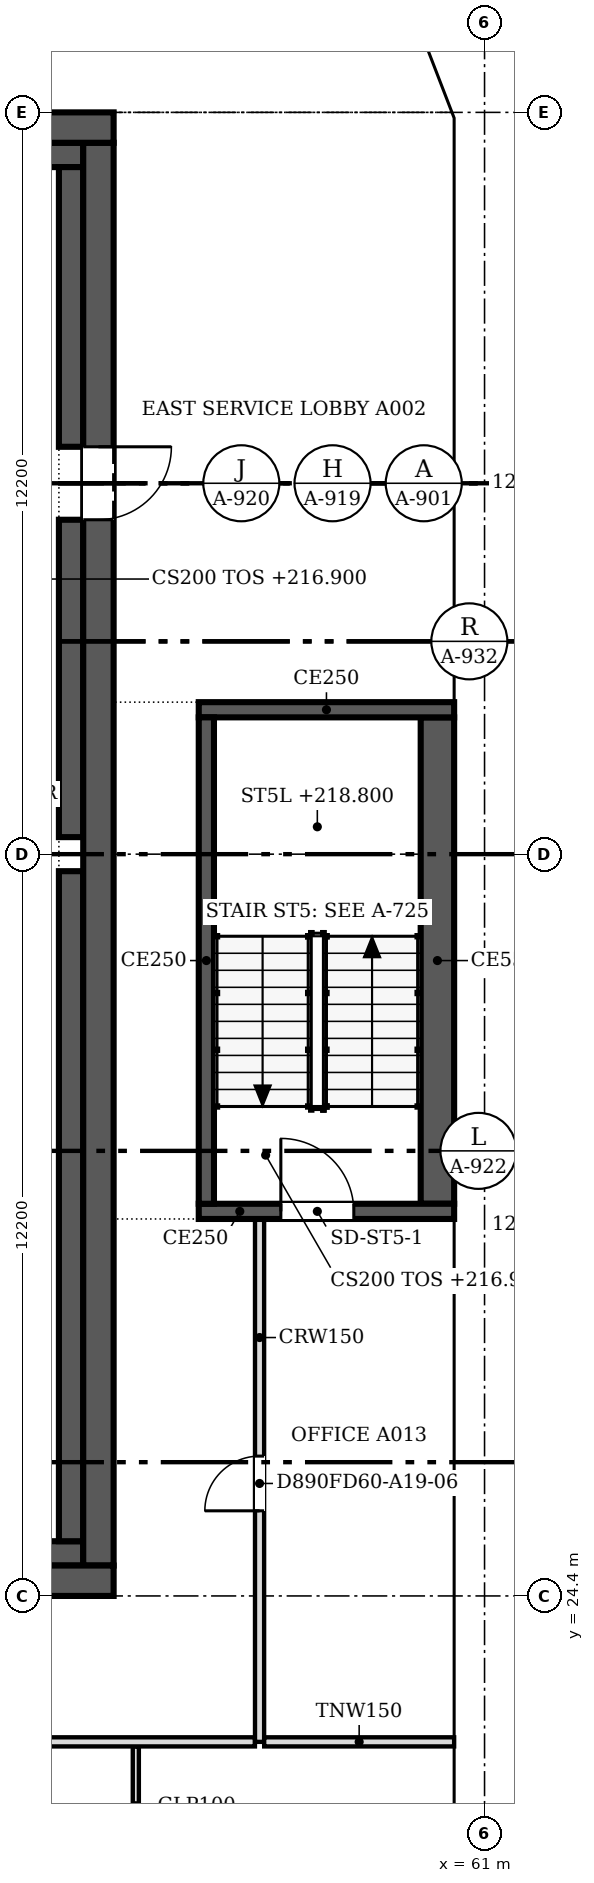
"""IFC4 building model, lengths in metres.
Left out: names, types, materials, properties, quantities, classifications, styles, units other than length and angle.
Written with IfcOpenShell. Run it as: python <this file> out.ifc"""

import sys

from ifc_helpers import new_model, si_unit, direction, frame, frame_2d, origin, place, context, subcontext, project, spatial, polyline, rectangle, outline, extrude, faceted_brep, source, transform, mapped, element, fill, save


model = new_model("IFC4")
c1 = context("Model", 3, precision=1e-05, world=origin(), true_north=direction((0.0, 1.0)))
c2 = subcontext(c1, "Body", "Model", "MODEL_VIEW")
j1 = project(units=[si_unit("LENGTHUNIT", "METRE"), si_unit("PLANEANGLEUNIT", "RADIAN")], contexts=[c1])
p1 = place(None, origin())
s1 = spatial("IfcSite", under=j1, at=p1, CompositionType="ELEMENT")
p2 = place(p1, origin())
s2 = spatial("IfcBuilding", under=s1, at=p2, CompositionType="ELEMENT")
p3 = place(p2, frame((0.0, 0.0, 216.9)))
s3 = spatial("IfcBuildingStorey", under=s2, at=p3, CompositionType="ELEMENT", Elevation=216.9)
m1 = source(origin(), c2, "Body", "SweptSolid", [
    extrude(outline(polyline([(3.05, 0.0), (6.1, 3.8), (3.05, 7.6), (0.0, 3.8), (3.05, 0.0)])), frame((0.0, 0.25, 0.0), z_axis=(0.0, -1.0, 0.0), x_axis=(1.0, 0.0, 0.0)), (0.0, 0.0, 1.0), 0.5),
])
p4 = place(p3, frame((60.75, 15.25, -3.8), z_axis=(0.0, 0.0, 1.0), x_axis=(0.0, 1.0, 0.0)))
e1 = element("IfcWall", 1, at=p4, inside=s3, PredefinedType="SOLIDWALL", context=c2, shape_type="MappedRepresentation", body=[
    mapped(m1, transform((0.0, 0.0, 0.0), scale=1.0)),
])
m2 = source(origin(), c2, "Body", "SweptSolid", [
    extrude(outline(polyline([(3.05, 0.399), (5.78, 3.8), (3.05, 7.2), (0.321, 3.8), (3.05, 0.399)])), frame((0.0, 0.26, 0.0), z_axis=(0.0, -1.0, 0.0), x_axis=(1.0, 0.0, 0.0)), (0.0, 0.0, 1.0), 0.52),
])
p5 = place(p4, origin())
e2 = element("IfcOpeningElement", 2, at=p5, cuts=e1, PredefinedType="OPENING", context=c2, shape_type="MappedRepresentation", body=[
    mapped(m2, transform((0.0, 0.0, 0.0), scale=1.0)),
])
m3 = source(origin(), c2, "Body", "Brep", [
    faceted_brep([(3.05, -0.25, 0.0), (6.1, -0.25, 3.8), (6.1, -0.25, 3.8), (3.05, -0.25, 7.6), (0.0, -0.25, 3.8), (0.0, 0.25, 3.8), (3.05, 0.25, 7.6), (6.1, 0.25, 3.8), (6.1, 0.25, 3.8), (3.05, 0.25, 0.0)], [[[0, 1, 2, 3, 4]], [[5, 6, 7, 8, 9]], [[9, 8, 1, 0]], [[7, 6, 3, 2]], [[6, 5, 4, 3]], [[5, 9, 0, 4]], [[1, 8, 7, 2]]]),
])
p6 = place(p3, frame((60.75, 21.35, -3.8), z_axis=(0.0, 0.0, 1.0), x_axis=(0.0, 1.0, 0.0)))
e3 = element("IfcWall", 3, at=p6, inside=s3, PredefinedType="SOLIDWALL", context=c2, shape_type="MappedRepresentation", body=[
    mapped(m3, transform((0.0, 0.0, 0.0), scale=1.0)),
])
p7 = place(p6, origin())
e4 = element("IfcOpeningElement", 4, at=p7, cuts=e3, PredefinedType="OPENING", context=c2, shape_type="MappedRepresentation", body=[
    mapped(m2, transform((0.0, 0.0, 0.0), scale=1.0)),
])
p8 = place(p3, frame((60.75, 27.45, -3.8), z_axis=(0.0, 0.0, 1.0), x_axis=(0.0, 1.0, 0.0)))
e5 = element("IfcWall", 5, at=p8, inside=s3, PredefinedType="SOLIDWALL", context=c2, shape_type="MappedRepresentation", body=[
    mapped(m1, transform((0.0, 0.0, 0.0), scale=1.0)),
])
p9 = place(p8, origin())
e6 = element("IfcOpeningElement", 6, at=p9, cuts=e5, PredefinedType="OPENING", context=c2, shape_type="MappedRepresentation", body=[
    mapped(m2, transform((0.0, 0.0, 0.0), scale=1.0)),
])
p10 = place(p3, frame((60.75, 33.55, -3.8), z_axis=(0.0, 0.0, 1.0), x_axis=(0.0, 1.0, 0.0)))
e7 = element("IfcWall", 7, at=p10, inside=s3, PredefinedType="SOLIDWALL", context=c2, shape_type="MappedRepresentation", body=[
    mapped(m3, transform((0.0, 0.0, 0.0), scale=1.0)),
])
p11 = place(p10, origin())
e8 = element("IfcOpeningElement", 8, at=p11, cuts=e7, PredefinedType="OPENING", context=c2, shape_type="MappedRepresentation", body=[
    mapped(m2, transform((0.0, 0.0, 0.0), scale=1.0)),
])
p12 = place(p3, frame((60.75, 39.65, -3.8), z_axis=(0.0, 0.0, 1.0), x_axis=(0.0, 1.0, 0.0)))
e9 = element("IfcWall", 9, at=p12, inside=s3, PredefinedType="SOLIDWALL", context=c2, shape_type="MappedRepresentation", body=[
    mapped(m1, transform((0.0, 0.0, 0.0), scale=1.0)),
])
p13 = place(p12, origin())
e10 = element("IfcOpeningElement", 10, at=p13, cuts=e9, PredefinedType="OPENING", context=c2, shape_type="MappedRepresentation", body=[
    mapped(m2, transform((0.0, 0.0, 0.0), scale=1.0)),
])
m4 = source(origin(), c2, "Body", "Brep", [
    faceted_brep([(3.003, -0.25, 0.0), (3.05, -0.25, 0.06), (3.05, -0.25, 7.54), (3.003, -0.25, 7.6), (0.0, -0.25, 3.8), (0.0, 0.25, 3.8), (2.957, 0.25, 7.541), (2.957, 0.25, 0.059), (3.003, 0.0, 0.0), (3.003, 0.0, 7.6)], [[[0, 1, 2, 3, 4]], [[5, 6, 7]], [[1, 0, 8]], [[9, 3, 2]], [[6, 5, 4, 3, 9]], [[5, 7, 8, 0, 4]], [[1, 8, 7, 6, 9, 2]]]),
])
p14 = place(p3, frame((60.75, 45.75, -3.8), z_axis=(0.0, 0.0, 1.0), x_axis=(0.0, 1.0, 0.0)))
e11 = element("IfcWall", 11, at=p14, inside=s3, PredefinedType="SOLIDWALL", context=c2, shape_type="MappedRepresentation", body=[
    mapped(m4, transform((0.0, 0.0, 0.0), scale=1.0)),
])
m5 = source(origin(), c2, "Body", "SweptSolid", [
    extrude(outline(polyline([(2.803, 6.944), (0.319, 3.8), (2.803, 0.656), (2.803, 6.944)])), frame((0.0, 0.26, 0.0), z_axis=(0.0, -1.0, 0.0), x_axis=(1.0, 0.0, 0.0)), (0.0, 0.0, 1.0), 0.52),
])
p15 = place(p14, origin())
e12 = element("IfcOpeningElement", 12, at=p15, cuts=e11, PredefinedType="OPENING", context=c2, shape_type="MappedRepresentation", body=[
    mapped(m5, transform((0.0, 0.0, 0.0), scale=1.0)),
])
m6 = source(origin(), c2, "Body", "Brep", [
    faceted_brep([(0.047, -0.25, 0.0), (2.997, -0.25, 3.8), (0.047, -0.25, 7.6), (0.0, -0.25, 7.541), (0.0, -0.25, 0.059), (0.093, 0.25, 7.54), (2.944, 0.25, 3.868), (2.944, 0.25, 3.732), (0.093, 0.25, 0.06), (2.997, 0.0, 3.8), (0.047, 0.0, 0.0), (0.047, 0.0, 7.6)], [[[0, 1, 2, 3, 4]], [[5, 6, 7, 8]], [[8, 7, 9, 1, 0, 10]], [[6, 5, 11, 2, 1, 9]], [[3, 2, 11]], [[10, 0, 4]], [[8, 10, 4, 3, 11, 5]], [[9, 7, 6]]]),
])
p16 = place(p3, frame((60.767, 48.71, -3.8), z_axis=(0.0, 0.0, 1.0), x_axis=(-0.359901446078, 0.932990326376, 0.0)))
e13 = element("IfcWall", 13, at=p16, inside=s3, PredefinedType="SOLIDWALL", context=c2, shape_type="MappedRepresentation", body=[
    mapped(m6, transform((0.0, 0.0, 0.0), scale=1.0)),
])
m7 = source(origin(), c2, "Body", "SweptSolid", [
    extrude(outline(polyline([(0.247, 0.665), (2.681, 3.8), (0.247, 6.935), (0.247, 0.665)])), frame((0.0, 0.26, 0.0), z_axis=(0.0, -1.0, 0.0), x_axis=(1.0, 0.0, 0.0)), (0.0, 0.0, 1.0), 0.52),
])
p17 = place(p16, origin())
e14 = element("IfcOpeningElement", 14, at=p17, cuts=e13, PredefinedType="OPENING", context=c2, shape_type="MappedRepresentation", body=[
    mapped(m7, transform((0.0, 0.0, 0.0), scale=1.0)),
])
p18 = place(p2, frame((0.0, 0.0, 220.7)))
s4 = spatial("IfcBuildingStorey", under=s2, at=p18, CompositionType="ELEMENT", Elevation=220.7)
m8 = source(origin(), c2, "Body", "Brep", [
    faceted_brep([(3.05, -0.25, 0.0), (6.1, -0.25, 3.8), (6.1, -0.25, 3.8), (3.05, -0.25, 7.6), (0.0, -0.25, 3.8), (0.0, 0.25, 3.8), (3.05, 0.25, 7.6), (6.1, 0.25, 3.8), (6.1, 0.25, 3.8), (3.05, 0.25, 0.0)], [[[0, 1, 2, 3, 4]], [[5, 6, 7, 8, 9]], [[9, 8, 1, 0]], [[7, 6, 3, 2]], [[6, 5, 4, 3]], [[5, 9, 0, 4]], [[1, 8, 7, 2]]]),
])
p19 = place(p18, frame((60.75, 18.3, -3.8), z_axis=(0.0, 0.0, 1.0), x_axis=(0.0, 1.0, 0.0)))
e15 = element("IfcWall", 15, at=p19, inside=s4, PredefinedType="SOLIDWALL", context=c2, shape_type="MappedRepresentation", body=[
    mapped(m8, transform((0.0, 0.0, 0.0), scale=1.0)),
])
m9 = source(origin(), c2, "Body", "SweptSolid", [
    extrude(outline(polyline([(3.05, 0.399), (5.78, 3.8), (3.05, 7.201), (0.321, 3.8), (3.05, 0.399)])), frame((0.0, 0.26, 0.0), z_axis=(0.0, -1.0, 0.0), x_axis=(1.0, 0.0, 0.0)), (0.0, 0.0, 1.0), 0.52),
])
p20 = place(p19, origin())
e16 = element("IfcOpeningElement", 16, at=p20, cuts=e15, PredefinedType="OPENING", context=c2, shape_type="MappedRepresentation", body=[
    mapped(m9, transform((0.0, 0.0, 0.0), scale=1.0)),
])
m10 = source(origin(), c2, "Body", "SweptSolid", [
    extrude(outline(polyline([(3.05, 0.0), (6.1, 3.8), (3.05, 7.6), (0.0, 3.8), (3.05, 0.0)])), frame((0.0, 0.25, 0.0), z_axis=(0.0, -1.0, 0.0), x_axis=(1.0, 0.0, 0.0)), (0.0, 0.0, 1.0), 0.5),
])
p21 = place(p18, frame((60.75, 24.4, -3.8), z_axis=(0.0, 0.0, 1.0), x_axis=(0.0, 1.0, 0.0)))
e17 = element("IfcWall", 17, at=p21, inside=s4, PredefinedType="SOLIDWALL", context=c2, shape_type="MappedRepresentation", body=[
    mapped(m10, transform((0.0, 0.0, 0.0), scale=1.0)),
])
p22 = place(p21, origin())
e18 = element("IfcOpeningElement", 18, at=p22, cuts=e17, PredefinedType="OPENING", context=c2, shape_type="MappedRepresentation", body=[
    mapped(m9, transform((0.0, 0.0, 0.0), scale=1.0)),
])
p23 = place(p18, frame((60.75, 30.5, -3.8), z_axis=(0.0, 0.0, 1.0), x_axis=(0.0, 1.0, 0.0)))
e19 = element("IfcWall", 19, at=p23, inside=s4, PredefinedType="SOLIDWALL", context=c2, shape_type="MappedRepresentation", body=[
    mapped(m10, transform((0.0, 0.0, 0.0), scale=1.0)),
])
p24 = place(p23, origin())
e20 = element("IfcOpeningElement", 20, at=p24, cuts=e19, PredefinedType="OPENING", context=c2, shape_type="MappedRepresentation", body=[
    mapped(m9, transform((0.0, 0.0, 0.0), scale=1.0)),
])
p25 = place(p18, frame((60.75, 36.6, -3.8), z_axis=(0.0, 0.0, 1.0), x_axis=(0.0, 1.0, 0.0)))
e21 = element("IfcWall", 21, at=p25, inside=s4, PredefinedType="SOLIDWALL", context=c2, shape_type="MappedRepresentation", body=[
    mapped(m8, transform((0.0, 0.0, 0.0), scale=1.0)),
])
p26 = place(p25, origin())
e22 = element("IfcOpeningElement", 22, at=p26, cuts=e21, PredefinedType="OPENING", context=c2, shape_type="MappedRepresentation", body=[
    mapped(m9, transform((0.0, 0.0, 0.0), scale=1.0)),
])
m11 = source(origin(), c2, "Body", "Brep", [
    faceted_brep([(3.05, -0.25, 0.0), (6.053, -0.25, 3.8), (3.05, -0.25, 7.6), (0.0, -0.25, 3.8), (0.0, 0.25, 3.8), (3.05, 0.25, 7.6), (6.007, 0.25, 3.859), (6.007, 0.25, 3.741), (3.05, 0.25, 0.0), (6.053, 0.0, 3.8)], [[[0, 1, 2, 3]], [[4, 5, 6, 7, 8]], [[8, 7, 9, 1, 0]], [[6, 5, 2, 1, 9]], [[5, 4, 3, 2]], [[4, 8, 0, 3]], [[9, 7, 6]]]),
])
p27 = place(p18, frame((60.75, 42.7, -3.8), z_axis=(0.0, 0.0, 1.0), x_axis=(0.0, 1.0, 0.0)))
e23 = element("IfcWall", 23, at=p27, inside=s4, PredefinedType="SOLIDWALL", context=c2, shape_type="MappedRepresentation", body=[
    mapped(m11, transform((0.0, 0.0, 0.0), scale=1.0)),
])
m12 = source(origin(), c2, "Body", "SweptSolid", [
    extrude(outline(polyline([(3.049, 0.401), (5.735, 3.8), (3.049, 7.199), (0.321, 3.8), (3.049, 0.401)])), frame((0.0, 0.26, 0.0), z_axis=(0.0, -1.0, 0.0), x_axis=(1.0, 0.0, 0.0)), (0.0, 0.0, 1.0), 0.52),
])
p28 = place(p27, origin())
e24 = element("IfcOpeningElement", 24, at=p28, cuts=e23, PredefinedType="OPENING", context=c2, shape_type="MappedRepresentation", body=[
    mapped(m12, transform((0.0, 0.0, 0.0), scale=1.0)),
])
m13 = source(origin(), c2, "Body", "Brep", [
    faceted_brep([(2.95, -0.25, 0.0), (3.003, -0.25, 0.068), (3.003, -0.25, 7.532), (2.95, -0.25, 7.6), (0.0, -0.25, 3.8), (0.047, 0.25, 3.86), (2.898, 0.25, 7.532), (2.898, 0.25, 0.068), (0.047, 0.25, 3.74), (2.95, 0.0, 0.0), (2.95, 0.0, 7.6), (0.0, 0.0, 3.8)], [[[0, 1, 2, 3, 4]], [[5, 6, 7, 8]], [[1, 0, 9]], [[10, 3, 2]], [[6, 5, 11, 4, 3, 10]], [[8, 7, 9, 0, 4, 11]], [[8, 11, 5]], [[1, 9, 7, 6, 10, 2]]]),
])
p29 = place(p18, frame((60.75, 48.753, -3.8), z_axis=(0.0, 0.0, 1.0), x_axis=(-0.35992665181, 0.932980602862, 0.0)))
e25 = element("IfcWall", 25, at=p29, inside=s4, PredefinedType="SOLIDWALL", context=c2, shape_type="MappedRepresentation", body=[
    mapped(m13, transform((0.0, 0.0, 0.0), scale=1.0)),
])
m14 = source(origin(), c2, "Body", "SweptSolid", [
    extrude(outline(polyline([(2.75, 6.935), (0.316, 3.8), (2.75, 0.665), (2.75, 6.935)])), frame((0.0, 0.26, 0.0), z_axis=(0.0, -1.0, 0.0), x_axis=(1.0, 0.0, 0.0)), (0.0, 0.0, 1.0), 0.52),
])
p30 = place(p29, origin())
e26 = element("IfcOpeningElement", 26, at=p30, cuts=e25, PredefinedType="OPENING", context=c2, shape_type="MappedRepresentation", body=[
    mapped(m14, transform((0.0, 0.0, 0.0), scale=1.0)),
])
p31 = place(p3, frame((54.9, 24.65, 0.0), z_axis=(0.0, 0.0, 1.0), x_axis=(-1.0, 0.0, 0.0)))
e27 = element("IfcWall", 27, at=p31, inside=s3, PredefinedType="SHEAR", context=c2, shape_type="SweptSolid", body=[
    extrude(rectangle(XDim=24.4, YDim=0.5, at=frame_2d((12.2, 0.0))), origin(), (0.0, 0.0, 1.0), 3.8),
])
m15 = source(origin(), c2, "Body", "SweptSolid", [
    extrude(rectangle(XDim=1.2, YDim=2.1, at=frame_2d((0.6, 1.05))), frame((0.0, 0.26, 0.0), z_axis=(0.0, -1.0, 0.0), x_axis=(1.0, 0.0, 0.0)), (0.0, 0.0, 1.0), 0.52),
])
p32 = place(p31, frame((1.5, 0.0, 0.0)))
e28 = element("IfcOpeningElement", 28, at=p32, cuts=e27, PredefinedType="OPENING", context=c2, shape_type="MappedRepresentation", body=[
    mapped(m15, transform((0.0, 0.0, 0.0), scale=1.0)),
])
p33 = place(p3, frame((30.5, 48.55, 0.0), z_axis=(0.0, 0.0, 1.0), x_axis=(1.0, 0.0, 0.0)))
e29 = element("IfcWall", 29, at=p33, inside=s3, PredefinedType="SHEAR", context=c2, shape_type="SweptSolid", body=[
    extrude(rectangle(XDim=24.4, YDim=0.5, at=frame_2d((12.2, 0.0))), origin(), (0.0, 0.0, 1.0), 3.8),
])
p34 = place(p3, frame((54.65, 48.3, 0.0), z_axis=(0.0, 0.0, 1.0), x_axis=(0.0, -1.0, 0.0)))
e30 = element("IfcWall", 30, at=p34, inside=s3, PredefinedType="SHEAR", context=c2, shape_type="SweptSolid", body=[
    extrude(rectangle(XDim=23.4, YDim=0.5, at=frame_2d((11.7, 0.0))), origin(), (0.0, 0.0, 1.0), 3.8),
])
p35 = place(p34, frame((5.0, 0.0, 0.0)))
e31 = element("IfcOpeningElement", 31, at=p35, cuts=e30, PredefinedType="OPENING", context=c2, shape_type="MappedRepresentation", body=[
    mapped(m15, transform((0.0, 0.0, 0.0), scale=1.0)),
])
p36 = place(p3, frame((53.4, 25.1, 0.0), z_axis=(0.0, 0.0, 1.0), x_axis=(1.0, 0.0, 0.0)))
e32 = element("IfcWall", 32, at=p36, inside=s3, PredefinedType="SOLIDWALL", context=c2, shape_type="SweptSolid", body=[
    extrude(rectangle(XDim=1.0, YDim=0.4, at=frame_2d((0.5, 0.0))), origin(), (0.0, 0.0, 1.0), 3.8),
])
p37 = place(p3, frame((31.0, 48.1, 0.0), z_axis=(0.0, 0.0, 1.0), x_axis=(1.0, 0.0, 0.0)))
e33 = element("IfcWall", 33, at=p37, inside=s3, PredefinedType="SOLIDWALL", context=c2, shape_type="SweptSolid", body=[
    extrude(rectangle(XDim=23.4, YDim=0.4, at=frame_2d((11.7, 0.0))), origin(), (0.0, 0.0, 1.0), 3.8),
])
p38 = place(p3, frame((54.2, 25.3, 0.0), z_axis=(0.0, 0.0, 1.0), x_axis=(0.0, 1.0, 0.0)))
e34 = element("IfcWall", 34, at=p38, inside=s3, PredefinedType="SOLIDWALL", context=c2, shape_type="SweptSolid", body=[
    extrude(rectangle(XDim=11.02, YDim=0.4, at=frame_2d((5.51, 0.0))), origin(), (0.0, 0.0, 1.0), 3.8),
])
p39 = place(p3, frame((54.2, 36.88, 0.0), z_axis=(0.0, 0.0, 1.0), x_axis=(0.0, 1.0, 0.0)))
e35 = element("IfcWall", 35, at=p39, inside=s3, PredefinedType="SOLIDWALL", context=c2, shape_type="SweptSolid", body=[
    extrude(rectangle(XDim=5.22, YDim=0.4, at=frame_2d((2.61, 0.0))), origin(), (0.0, 0.0, 1.0), 3.8),
])
p40 = place(p3, frame((54.2, 43.3, 0.0), z_axis=(0.0, 0.0, 1.0), x_axis=(0.0, 1.0, 0.0)))
e36 = element("IfcWall", 36, at=p40, inside=s3, PredefinedType="SOLIDWALL", context=c2, shape_type="SweptSolid", body=[
    extrude(rectangle(XDim=4.6, YDim=0.4, at=frame_2d((2.3, 0.0))), origin(), (0.0, 0.0, 1.0), 3.8),
])
p41 = place(p3, frame((60.5, 30.725, 0.0), z_axis=(0.0, 0.0, 1.0), x_axis=(-1.0, 0.0, 0.0)))
e37 = element("IfcWall", 37, at=p41, inside=s3, PredefinedType="SOLIDWALL", context=c2, shape_type="SweptSolid", body=[
    extrude(rectangle(XDim=4.2, YDim=0.25, at=frame_2d((2.1, 0.0))), origin(), (0.0, 0.0, 1.0), 3.8),
])
m16 = source(origin(), c2, "Body", "SweptSolid", [
    extrude(rectangle(XDim=1.2, YDim=2.1, at=frame_2d((0.6, 1.05))), frame((0.0, 0.135, 0.0), z_axis=(0.0, -1.0, 0.0), x_axis=(1.0, 0.0, 0.0)), (0.0, 0.0, 1.0), 0.27),
])
p42 = place(p41, frame((1.65, 0.0, 0.0)))
e38 = element("IfcOpeningElement", 38, at=p42, cuts=e37, PredefinedType="OPENING", context=c2, shape_type="MappedRepresentation", body=[
    mapped(m16, transform((0.0, 0.0, 0.0), scale=1.0)),
])
p43 = place(p3, frame((56.425, 30.85, 0.0), z_axis=(0.0, 0.0, 1.0), x_axis=(0.0, 1.0, 0.0)))
e39 = element("IfcWall", 39, at=p43, inside=s3, PredefinedType="SOLIDWALL", context=c2, shape_type="SweptSolid", body=[
    extrude(rectangle(XDim=8.0, YDim=0.25, at=frame_2d((4.0, 0.0))), origin(), (0.0, 0.0, 1.0), 3.8),
])
p44 = place(p3, frame((56.3, 38.975, 0.0), z_axis=(0.0, 0.0, 1.0), x_axis=(1.0, 0.0, 0.0)))
e40 = element("IfcWall", 40, at=p44, inside=s3, PredefinedType="SOLIDWALL", context=c2, shape_type="SweptSolid", body=[
    extrude(rectangle(XDim=4.2, YDim=0.25, at=frame_2d((2.1, 0.0))), origin(), (0.0, 0.0, 1.0), 3.8),
])
p45 = place(p3, frame((60.225, 38.85, 0.0), z_axis=(0.0, 0.0, 1.0), x_axis=(0.0, -1.0, 0.0)))
e41 = element("IfcWall", 41, at=p45, inside=s3, PredefinedType="SOLIDWALL", context=c2, shape_type="SweptSolid", body=[
    extrude(rectangle(XDim=8.0, YDim=0.55, at=frame_2d((4.0, 0.0))), origin(), (0.0, 0.0, 1.0), 3.8),
])
p46 = place(p3, frame((55.265, 21.924, 0.0), z_axis=(0.0, 0.0, 1.0), x_axis=(0.0, -1.0, 0.0)))
e42 = element("IfcWall", 42, at=p46, inside=s3, PredefinedType="PARTITIONING", context=c2, shape_type="SweptSolid", body=[
    extrude(rectangle(XDim=4.748, YDim=0.1, at=frame_2d((2.374, 0.0))), origin(), (0.0, 0.0, 1.0), 3.067),
])
m17 = source(origin(), c2, "Body", "SweptSolid", [
    extrude(rectangle(XDim=0.9, YDim=2.1, at=frame_2d((0.45, 1.05))), frame((0.0, 0.06, 0.0), z_axis=(0.0, -1.0, 0.0), x_axis=(1.0, 0.0, 0.0)), (0.0, 0.0, 1.0), 0.12),
])
p47 = place(p46, frame((1.948, 0.0, 0.0)))
e43 = element("IfcOpeningElement", 43, at=p47, cuts=e42, PredefinedType="OPENING", context=c2, shape_type="MappedRepresentation", body=[
    mapped(m17, transform((0.0, 0.0, 0.0), scale=1.0)),
])
p48 = place(p3, frame((46.4, 22.0, 0.0), z_axis=(0.0, 0.0, 1.0), x_axis=(1.0, 0.0, 0.0)))
e44 = element("IfcWall", 44, at=p48, inside=s3, PredefinedType="PARTITIONING", context=c2, shape_type="SweptSolid", body=[
    extrude(rectangle(XDim=10.824, YDim=0.15, at=frame_2d((5.412, 0.0))), origin(), (0.0, 0.0, 1.0), 3.067),
])
p49 = place(p3, frame((57.3, 30.6, 0.0), z_axis=(0.0, 0.0, 1.0), x_axis=(0.0, -1.0, 0.0)))
e45 = element("IfcWall", 45, at=p49, inside=s3, PredefinedType="PARTITIONING", context=c2, shape_type="SweptSolid", body=[
    extrude(rectangle(XDim=8.6, YDim=0.15, at=frame_2d((4.3, 0.0))), origin(), (0.0, 0.0, 1.0), 3.067),
])
m18 = source(origin(), c2, "Body", "SweptSolid", [
    extrude(rectangle(XDim=0.9, YDim=2.1, at=frame_2d((0.45, 1.05))), frame((0.0, 0.085, 0.0), z_axis=(0.0, -1.0, 0.0), x_axis=(1.0, 0.0, 0.0)), (0.0, 0.0, 1.0), 0.17),
])
p50 = place(p49, frame((3.9, 0.0, 0.0)))
e46 = element("IfcOpeningElement", 46, at=p50, cuts=e45, PredefinedType="OPENING", context=c2, shape_type="MappedRepresentation", body=[
    mapped(m18, transform((0.0, 0.0, 0.0), scale=1.0)),
])
p51 = place(p3, frame((57.376, 22.0, 0.0), z_axis=(0.0, 0.0, 1.0), x_axis=(1.0, 0.0, 0.0)))
e47 = element("IfcWall", 47, at=p51, inside=s3, PredefinedType="PARTITIONING", context=c2, shape_type="SweptSolid", body=[
    extrude(rectangle(XDim=3.124, YDim=0.15, at=frame_2d((1.562, 0.0))), origin(), (0.0, 0.0, 1.0), 3.067),
])
m19 = source(origin(), c2, "Body", "SweptSolid", [
    extrude(rectangle(XDim=1.2, YDim=2.1, at=frame_2d((0.6, 1.05))), frame((0.0, 0.025, 0.0), z_axis=(0.0, -1.0, 0.0), x_axis=(1.0, 0.0, 0.0)), (0.0, 0.0, 1.0), 0.05),
])
p52 = place(p35, origin())
e48 = element("IfcDoor", 48, at=p52, inside=s3, OperationType="SINGLE_SWING_LEFT", PredefinedType="DOOR", context=c2, shape_type="MappedRepresentation", body=[
    mapped(m19, transform((0.0, 0.0, 0.0), scale=1.0)),
])
fill(e31, e48)
p53 = place(p42, origin())
e49 = element("IfcDoor", 49, at=p53, inside=s3, OperationType="SINGLE_SWING_RIGHT", PredefinedType="DOOR", context=c2, shape_type="MappedRepresentation", body=[
    mapped(m19, transform((0.0, 0.0, 0.0), scale=1.0)),
])
fill(e38, e49)
m20 = source(origin(), c2, "Body", "SweptSolid", [
    extrude(rectangle(XDim=0.9, YDim=2.1, at=frame_2d((0.45, 1.05))), frame((0.0, 0.025, 0.0), z_axis=(0.0, -1.0, 0.0), x_axis=(1.0, 0.0, 0.0)), (0.0, 0.0, 1.0), 0.05),
])
p54 = place(p50, origin())
e50 = element("IfcDoor", 50, at=p54, inside=s3, OperationType="SINGLE_SWING_RIGHT", PredefinedType="DOOR", context=c2, shape_type="MappedRepresentation", body=[
    mapped(m20, transform((0.0, 0.0, 0.0), scale=1.0)),
])
fill(e46, e50)
save(model, sys.argv[1])
